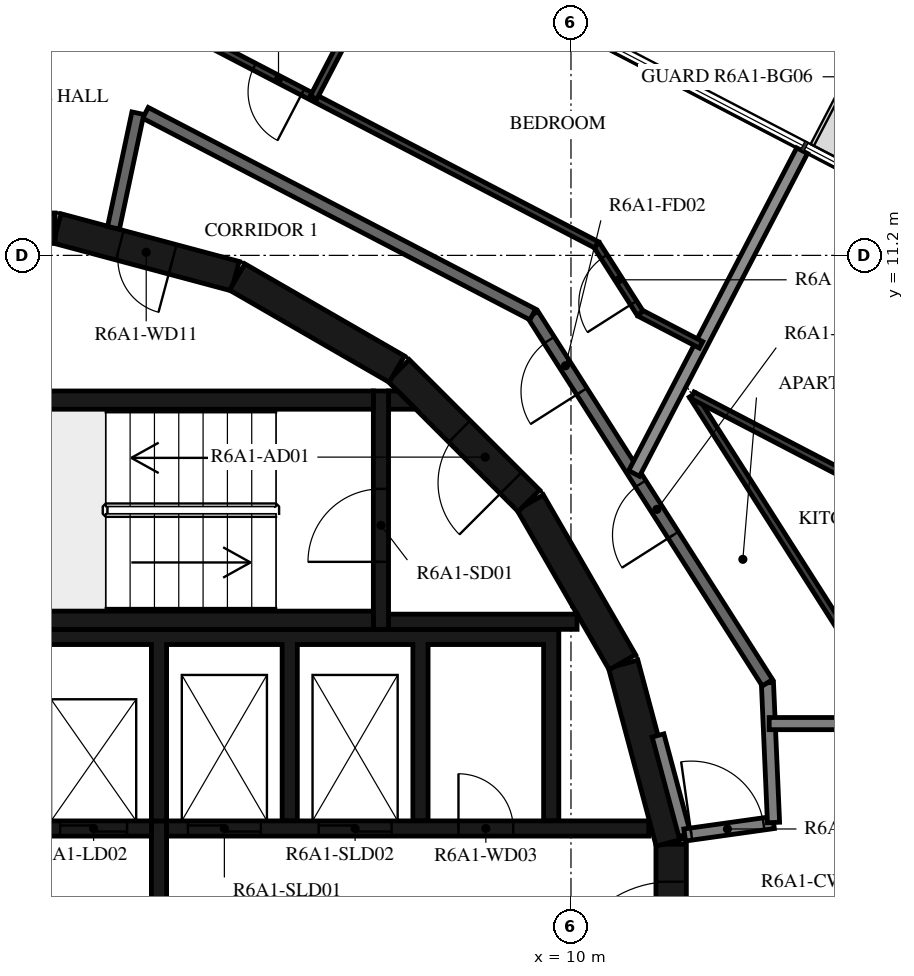
"""IFC4 building model, lengths in metres.
Left out: names, types, materials, properties, quantities, classifications, styles, units other than length and angle.
Written with IfcOpenShell. Run it as: python <this file> out.ifc"""

import sys

from ifc_helpers import new_model, si_unit, direction, frame, frame_2d, origin, place, context, subcontext, project, spatial, polyline, rectangle, outline, extrude, element, fill, save


model = new_model("IFC4")
c1 = context("Model", 3, precision=1e-05, world=origin(), true_north=direction((0.0, 1.0)))
c2 = subcontext(c1, "Body", "Model", "MODEL_VIEW")
j1 = project(units=[si_unit("LENGTHUNIT", "METRE"), si_unit("PLANEANGLEUNIT", "RADIAN")], contexts=[c1])
p1 = place(None, origin())
s1 = spatial("IfcSite", under=j1, at=p1, CompositionType="ELEMENT")
p2 = place(p1, origin())
s2 = spatial("IfcBuilding", under=s1, at=p2, CompositionType="ELEMENT")
p3 = place(p2, frame((0.0, 0.0, 230.2)))
s3 = spatial("IfcBuildingStorey", under=s2, at=p3, CompositionType="ELEMENT", Elevation=230.2)
p4 = place(p3, frame((11.647, -1.516, 0.0), z_axis=(0.0, 0.0, 1.0), x_axis=(0.0, 1.0, 0.0)))
e1 = element("IfcWall", 1, at=p4, inside=s3, PredefinedType="SHEAR", context=c2, shape_type="SweptSolid", body=[
    extrude(rectangle(XDim=3.033, YDim=0.5, at=frame_2d((1.516, 0.0))), origin(), (0.0, 0.0, 1.0), 3.12),
])
p5 = place(p4, frame((0.616, 0.0, 0.0)))
e2 = element("IfcOpeningElement", 2, at=p5, cuts=e1, PredefinedType="OPENING", context=c2, shape_type="SweptSolid", body=[
    extrude(rectangle(XDim=1.8, YDim=2.1, at=frame_2d((0.9, 1.05))), frame((0.0, 0.26, 0.0), z_axis=(0.0, -1.0, 0.0), x_axis=(1.0, 0.0, 0.0)), (0.0, 0.0, 1.0), 0.52),
])
for number, where, z_axis, x_axis in (
    (3, (11.643, 1.55, 0.0), (0.0, 0.0, 1.0), (-0.259, 0.966, 0.0)),
    (4, (10.845, 4.51, 0.0), (0.0, 0.0, 1.0), (-0.5, 0.866, 0.0)),
):
    element("IfcWall", number, at=place(p3, frame(where, z_axis=z_axis, x_axis=x_axis)), inside=s3, PredefinedType="SHEAR", context=c2, shape_type="SweptSolid", body=[
        extrude(rectangle(XDim=3.033, YDim=0.5, at=frame_2d((1.516, 0.0))), origin(), (0.0, 0.0, 1.0), 3.12),
    ])
p6 = place(p3, frame((9.308, 7.164, 0.0), z_axis=(0.0, 0.0, 1.0), x_axis=(-0.707106781187, 0.707106781187, 0.0)))
e5 = element("IfcWall", 5, at=p6, inside=s3, PredefinedType="SHEAR", context=c2, shape_type="SweptSolid", body=[
    extrude(rectangle(XDim=3.032, YDim=0.5, at=frame_2d((1.516, 0.0))), origin(), (0.0, 0.0, 1.0), 3.12),
])
p7 = place(p6, frame((0.416, 0.0, 0.0)))
e6 = element("IfcOpeningElement", 6, at=p7, cuts=e5, PredefinedType="OPENING", context=c2, shape_type="SweptSolid", body=[
    extrude(rectangle(XDim=1.2, YDim=2.1, at=frame_2d((0.6, 1.05))), frame((0.0, 0.26, 0.0), z_axis=(0.0, -1.0, 0.0), x_axis=(1.0, 0.0, 0.0)), (0.0, 0.0, 1.0), 0.52),
])
p8 = place(p3, frame((7.137, 9.329, 0.0), z_axis=(0.0, 0.0, 1.0), x_axis=(-0.865975092491, 0.500087131594, 0.0)))
e7 = element("IfcWall", 7, at=p8, inside=s3, PredefinedType="SHEAR", context=c2, shape_type="SweptSolid", body=[
    extrude(rectangle(XDim=3.033, YDim=0.5, at=frame_2d((1.516, 0.0))), origin(), (0.0, 0.0, 1.0), 3.12),
])
p9 = place(p3, frame((4.479, 10.858, 0.0), z_axis=(0.0, 0.0, 1.0), x_axis=(-0.965948410781, 0.258734743916, 0.0)))
e8 = element("IfcWall", 8, at=p9, inside=s3, PredefinedType="SHEAR", context=c2, shape_type="SweptSolid", body=[
    extrude(rectangle(XDim=3.033, YDim=0.5, at=frame_2d((1.516, 0.0))), origin(), (0.0, 0.0, 1.0), 3.12),
])
p10 = place(p9, frame((1.066, 0.0, 0.0)))
e9 = element("IfcOpeningElement", 9, at=p10, cuts=e8, PredefinedType="OPENING", context=c2, shape_type="SweptSolid", body=[
    extrude(rectangle(XDim=0.9, YDim=2.1, at=frame_2d((0.45, 1.05))), frame((0.0, 0.26, 0.0), z_axis=(0.0, -1.0, 0.0), x_axis=(1.0, 0.0, 0.0)), (0.0, 0.0, 1.0), 0.52),
])
p11 = place(p3, frame((1.516, 11.647, 0.0), z_axis=(0.0, 0.0, 1.0), x_axis=(-1.0, 0.0, 0.0)))
e10 = element("IfcWall", 10, at=p11, inside=s3, PredefinedType="SHEAR", context=c2, shape_type="SweptSolid", body=[
    extrude(rectangle(XDim=3.033, YDim=0.5, at=frame_2d((1.516, 0.0))), origin(), (0.0, 0.0, 1.0), 3.12),
])
for number, where, z_axis, x_axis in (
    (11, (0.0, 5.2, 0.0), (0.0, 0.0, 1.0), (1.0, 0.0, 0.0)),
    (12, (0.0, 8.82, 0.0), (0.0, 0.0, 1.0), (1.0, 0.0, 0.0)),
):
    element("IfcWall", number, at=place(p3, frame(where, z_axis=z_axis, x_axis=x_axis)), inside=s3, PredefinedType="SHEAR", context=c2, shape_type="SweptSolid", body=[
        extrude(rectangle(XDim=6.75, YDim=0.3, at=frame_2d((3.375, 0.0))), origin(), (0.0, 0.0, 1.0), 3.12),
    ])
p12 = place(p3, frame((6.875, 5.05, 0.0), z_axis=(0.0, 0.0, 1.0), x_axis=(0.0, 1.0, 0.0)))
e13 = element("IfcWall", 13, at=p12, inside=s3, PredefinedType="SHEAR", context=c2, shape_type="SweptSolid", body=[
    extrude(rectangle(XDim=3.92, YDim=0.25, at=frame_2d((1.96, 0.0))), origin(), (0.0, 0.0, 1.0), 3.12),
])
p13 = place(p12, frame((1.11, 0.0, 0.0)))
e14 = element("IfcOpeningElement", 14, at=p13, cuts=e13, PredefinedType="OPENING", context=c2, shape_type="SweptSolid", body=[
    extrude(rectangle(XDim=1.2, YDim=2.1, at=frame_2d((0.6, 1.05))), frame((0.0, 0.135, 0.0), z_axis=(0.0, -1.0, 0.0), x_axis=(1.0, 0.0, 0.0)), (0.0, 0.0, 1.0), 0.27),
])
p14 = place(p3, frame((7.0, 5.175, 0.0), z_axis=(0.0, 0.0, 1.0), x_axis=(1.0, 0.0, 0.0)))
e15 = element("IfcWall", 15, at=p14, inside=s3, PredefinedType="SHEAR", context=c2, shape_type="SweptSolid", body=[
    extrude(rectangle(XDim=3.1, YDim=0.25, at=frame_2d((1.55, 0.0))), origin(), (0.0, 0.0, 1.0), 3.12),
])
p15 = place(p3, origin())
e16 = element("IfcWall", 16, at=p15, inside=s3, PredefinedType="SHEAR", context=c2, shape_type="SweptSolid", body=[
    extrude(outline(polyline([(7.448, 8.67), (7.0, 8.67), (7.0, 8.97), (7.148, 8.97), (7.448, 8.67)])), origin(), (0.0, 0.0, 1.0), 3.12),
])
p16 = place(p3, origin())
e17 = element("IfcWall", 17, at=p16, inside=s3, PredefinedType="SHEAR", context=c2, shape_type="SweptSolid", body=[
    extrude(outline(polyline([(-9.55, 4.8), (-5.5, 4.8), (-5.5, 1.9), (-5.25, 1.9), (-5.25, 4.8), (-1.2, 4.8), (-1.2, 1.9), (-0.95, 1.9), (-0.95, 4.8), (0.95, 4.8), (0.95, 1.9), (1.2, 1.9), (1.2, 4.8), (3.1, 4.8), (3.1, 1.9), (3.35, 1.9), (3.35, 4.8), (5.25, 4.8), (5.25, 1.9), (5.5, 1.9), (5.5, 4.8), (7.4, 4.8), (7.4, 1.9), (7.65, 1.9), (7.65, 4.8), (9.55, 4.8), (9.55, 1.9), (9.8, 1.9), (9.8, 4.8), (9.8, 5.05), (-9.8, 5.05), (-9.8, 4.8), (-9.8, 1.9), (-9.55, 1.9), (-9.55, 4.8)])), origin(), (0.0, 0.0, 1.0), 3.12),
])
p17 = place(p3, frame((-11.28, 1.775, 0.0), z_axis=(0.0, 0.0, 1.0), x_axis=(1.0, 0.0, 0.0)))
e18 = element("IfcWall", 18, at=p17, inside=s3, PredefinedType="SHEAR", context=c2, shape_type="SweptSolid", body=[
    extrude(rectangle(XDim=14.38, YDim=0.25, at=frame_2d((7.19, 0.0))), origin(), (0.0, 0.0, 1.0), 3.12),
])
p18 = place(p17, frame((10.73, 0.0, 0.0)))
e19 = element("IfcOpeningElement", 19, at=p18, cuts=e18, PredefinedType="OPENING", context=c2, shape_type="SweptSolid", body=[
    extrude(rectangle(XDim=1.1, YDim=2.1, at=frame_2d((0.55, 1.05))), frame((0.0, 0.135, 0.0), z_axis=(0.0, -1.0, 0.0), x_axis=(1.0, 0.0, 0.0)), (0.0, 0.0, 1.0), 0.27),
])
p19 = place(p17, frame((12.88, 0.0, 0.0)))
e20 = element("IfcOpeningElement", 20, at=p19, cuts=e18, PredefinedType="OPENING", context=c2, shape_type="SweptSolid", body=[
    extrude(rectangle(XDim=1.1, YDim=2.1, at=frame_2d((0.55, 1.05))), frame((0.0, 0.135, 0.0), z_axis=(0.0, -1.0, 0.0), x_axis=(1.0, 0.0, 0.0)), (0.0, 0.0, 1.0), 0.27),
])
p20 = place(p17, frame((3.305, 0.0, 0.0)))
e21 = element("IfcOpeningElement", 21, at=p20, cuts=e18, PredefinedType="OPENING", context=c2, shape_type="SweptSolid", body=[
    extrude(rectangle(XDim=0.9, YDim=2.1, at=frame_2d((0.45, 1.05))), frame((0.0, 0.135, 0.0), z_axis=(0.0, -1.0, 0.0), x_axis=(1.0, 0.0, 0.0)), (0.0, 0.0, 1.0), 0.27),
])
p21 = place(p17, frame((7.605, 0.0, 0.0)))
e22 = element("IfcOpeningElement", 22, at=p21, cuts=e18, PredefinedType="OPENING", context=c2, shape_type="SweptSolid", body=[
    extrude(rectangle(XDim=0.9, YDim=2.1, at=frame_2d((0.45, 1.05))), frame((0.0, 0.135, 0.0), z_axis=(0.0, -1.0, 0.0), x_axis=(1.0, 0.0, 0.0)), (0.0, 0.0, 1.0), 0.27),
])
p22 = place(p3, frame((3.35, 1.775, 0.0), z_axis=(0.0, 0.0, 1.0), x_axis=(1.0, 0.0, 0.0)))
e23 = element("IfcWall", 23, at=p22, inside=s3, PredefinedType="SHEAR", context=c2, shape_type="SweptSolid", body=[
    extrude(rectangle(XDim=7.93, YDim=0.25, at=frame_2d((3.965, 0.0))), origin(), (0.0, 0.0, 1.0), 3.12),
])
p23 = place(p22, frame((0.35, 0.0, 0.0)))
e24 = element("IfcOpeningElement", 24, at=p23, cuts=e23, PredefinedType="OPENING", context=c2, shape_type="SweptSolid", body=[
    extrude(rectangle(XDim=1.2, YDim=2.4, at=frame_2d((0.6, 1.2))), frame((0.0, 0.135, 0.0), z_axis=(0.0, -1.0, 0.0), x_axis=(1.0, 0.0, 0.0)), (0.0, 0.0, 1.0), 0.27),
])
p24 = place(p22, frame((2.5, 0.0, 0.0)))
e25 = element("IfcOpeningElement", 25, at=p24, cuts=e23, PredefinedType="OPENING", context=c2, shape_type="SweptSolid", body=[
    extrude(rectangle(XDim=1.2, YDim=2.4, at=frame_2d((0.6, 1.2))), frame((0.0, 0.135, 0.0), z_axis=(0.0, -1.0, 0.0), x_axis=(1.0, 0.0, 0.0)), (0.0, 0.0, 1.0), 0.27),
])
p25 = place(p22, frame((4.8, 0.0, 0.0)))
e26 = element("IfcOpeningElement", 26, at=p25, cuts=e23, PredefinedType="OPENING", context=c2, shape_type="SweptSolid", body=[
    extrude(rectangle(XDim=0.9, YDim=2.1, at=frame_2d((0.45, 1.05))), frame((0.0, 0.135, 0.0), z_axis=(0.0, -1.0, 0.0), x_axis=(1.0, 0.0, 0.0)), (0.0, 0.0, 1.0), 0.27),
])
p26 = place(p3, frame((3.225, -1.9, 0.0), z_axis=(0.0, 0.0, 1.0), x_axis=(0.0, 1.0, 0.0)))
e27 = element("IfcWall", 27, at=p26, inside=s3, PredefinedType="SHEAR", context=c2, shape_type="SweptSolid", body=[
    extrude(rectangle(XDim=3.8, YDim=0.25, at=frame_2d((1.9, 0.0))), origin(), (0.0, 0.0, 1.0), 3.12),
])
p27 = place(p3, frame((11.87, 1.668, 0.0), z_axis=(0.0, 0.0, 1.0), x_axis=(-0.258836880648, 0.965921047093, 0.0)))
e28 = element("IfcWall", 28, at=p27, inside=s3, PredefinedType="STANDARD", context=c2, shape_type="SweptSolid", body=[
    extrude(rectangle(XDim=1.695, YDim=0.2, at=frame_2d((0.848, 0.0))), origin(), (0.0, 0.0, 1.0), 3.12),
])
p28 = place(p3, frame((11.87, 1.668, 0.0), z_axis=(0.0, 0.0, 1.0), x_axis=(0.990267985606, 0.139173692496, 0.0)))
e29 = element("IfcWall", 29, at=p28, inside=s3, PredefinedType="STANDARD", context=c2, shape_type="SweptSolid", body=[
    extrude(rectangle(XDim=1.475, YDim=0.2, at=frame_2d((0.738, 0.0))), origin(), (0.0, 0.0, 1.0), 3.12),
])
p29 = place(p28, frame((0.11, 0.0, 0.0)))
e30 = element("IfcOpeningElement", 30, at=p29, cuts=e29, PredefinedType="OPENING", context=c2, shape_type="SweptSolid", body=[
    extrude(rectangle(XDim=1.2, YDim=2.1, at=frame_2d((0.6, 1.05))), frame((0.0, 0.11, 0.0), z_axis=(0.0, -1.0, 0.0), x_axis=(1.0, 0.0, 0.0)), (0.0, 0.0, 1.0), 0.22),
])
p30 = place(p3, frame((13.331, 1.874, 0.0), z_axis=(0.0, 0.0, 1.0), x_axis=(-0.043621457762, 0.999048131184, 0.0)))
e31 = element("IfcWall", 31, at=p30, inside=s3, PredefinedType="STANDARD", context=c2, shape_type="SweptSolid", body=[
    extrude(rectangle(XDim=2.3, YDim=0.2, at=frame_2d((1.15, 0.0))), origin(), (0.0, 0.0, 1.0), 3.12),
])
p31 = place(p3, frame((13.231, 4.172, 0.0), z_axis=(0.0, 0.0, 1.0), x_axis=(-0.537304397561, 0.843388394728, 0.0)))
e32 = element("IfcWall", 32, at=p31, inside=s3, PredefinedType="STANDARD", context=c2, shape_type="SweptSolid", body=[
    extrude(rectangle(XDim=7.181, YDim=0.2, at=frame_2d((3.59, 0.0))), origin(), (0.0, 0.0, 1.0), 3.12),
])
p32 = place(p31, frame((2.881, 0.0, 0.0)))
e33 = element("IfcOpeningElement", 33, at=p32, cuts=e32, PredefinedType="OPENING", context=c2, shape_type="SweptSolid", body=[
    extrude(rectangle(XDim=1.0, YDim=2.1, at=frame_2d((0.5, 1.05))), frame((0.0, 0.11, 0.0), z_axis=(0.0, -1.0, 0.0), x_axis=(1.0, 0.0, 0.0)), (0.0, 0.0, 1.0), 0.22),
])
p33 = place(p31, frame((5.681, 0.0, 0.0)))
e34 = element("IfcOpeningElement", 34, at=p33, cuts=e32, PredefinedType="OPENING", context=c2, shape_type="SweptSolid", body=[
    extrude(rectangle(XDim=1.0, YDim=2.1, at=frame_2d((0.5, 1.05))), frame((0.0, 0.11, 0.0), z_axis=(0.0, -1.0, 0.0), x_axis=(1.0, 0.0, 0.0)), (0.0, 0.0, 1.0), 0.22),
])
p34 = place(p3, frame((9.372, 10.228, 0.0), z_axis=(0.0, 0.0, 1.0), x_axis=(-0.887005184532, 0.461759464021, 0.0)))
e35 = element("IfcWall", 35, at=p34, inside=s3, PredefinedType="STANDARD", context=c2, shape_type="SweptSolid", body=[
    extrude(rectangle(XDim=7.181, YDim=0.2, at=frame_2d((3.591, 0.0))), origin(), (0.0, 0.0, 1.0), 3.12),
])
p35 = place(p3, frame((2.878, 13.538, 0.0), z_axis=(0.0, 0.0, 1.0), x_axis=(-0.207893604596, -0.978151444904, 0.0)))
e36 = element("IfcWall", 36, at=p35, inside=s3, PredefinedType="STANDARD", context=c2, shape_type="SweptSolid", body=[
    extrude(rectangle(XDim=1.927, YDim=0.2, at=frame_2d((0.963, 0.0))), origin(), (0.0, 0.0, 1.0), 3.12),
])
p36 = place(p3, frame((17.9, 3.5, 0.0), z_axis=(0.0, 0.0, 1.0), x_axis=(-1.0, 0.0, 0.0)))
e37 = element("IfcWall", 37, at=p36, inside=s3, PredefinedType="STANDARD", context=c2, shape_type="SweptSolid", body=[
    extrude(rectangle(XDim=4.64, YDim=0.2, at=frame_2d((2.32, 0.0))), origin(), (0.0, 0.0, 1.0), 3.12),
])
p37 = place(p3, frame((13.801, 12.922, 0.0), z_axis=(0.0, 0.0, 1.0), x_axis=(-0.461726485624, -0.887022351733, 0.0)))
e38 = element("IfcWall", 38, at=p37, inside=s3, PredefinedType="STANDARD", context=c2, shape_type="SweptSolid", body=[
    extrude(rectangle(XDim=5.984, YDim=0.2, at=frame_2d((2.992, 0.0))), origin(), (0.0, 0.0, 1.0), 2.73),
])
p38 = place(p3, frame((14.615, 4.79, 0.0), z_axis=(0.0, 0.0, 1.0), x_axis=(-0.537312928062, 0.843382960071, 0.0)))
e39 = element("IfcWall", 39, at=p38, inside=s3, PredefinedType="PARTITIONING", context=c2, shape_type="SweptSolid", body=[
    extrude(rectangle(XDim=4.875, YDim=0.12, at=frame_2d((2.437, 0.0))), origin(), (0.0, 0.0, 1.0), 3.12),
])
p39 = place(p3, frame((21.085, 4.169, 0.0), z_axis=(0.0, 0.0, 1.0), x_axis=(-0.887017373034, 0.461736050071, 0.0)))
e40 = element("IfcWall", 40, at=p39, inside=s3, PredefinedType="PARTITIONING", context=c2, shape_type="SweptSolid", body=[
    extrude(rectangle(XDim=10.247, YDim=0.12, at=frame_2d((5.123, 0.0))), origin(), (0.0, 0.0, 1.0), 3.12),
])
p40 = place(p39, frame((3.425, 0.0, 0.0)))
e41 = element("IfcOpeningElement", 41, at=p40, cuts=e40, PredefinedType="OPENING", context=c2, shape_type="SweptSolid", body=[
    extrude(rectangle(XDim=0.9, YDim=2.1, at=frame_2d((0.45, 1.05))), frame((0.0, 0.07, 0.0), z_axis=(0.0, -1.0, 0.0), x_axis=(1.0, 0.0, 0.0)), (0.0, 0.0, 1.0), 0.14),
])
p41 = place(p3, frame((12.139, 9.729, 0.0), z_axis=(0.0, 0.0, 1.0), x_axis=(-0.887046876331, 0.461679368383, 0.0)))
e42 = element("IfcWall", 42, at=p41, inside=s3, PredefinedType="PARTITIONING", context=c2, shape_type="SweptSolid", body=[
    extrude(rectangle(XDim=1.13, YDim=0.12, at=frame_2d((0.565, 0.0))), origin(), (0.0, 0.0, 1.0), 3.12),
])
p42 = place(p3, frame((11.137, 10.25, 0.0), z_axis=(0.0, 0.0, 1.0), x_axis=(-0.537231369635, 0.843434914786, 0.0)))
e43 = element("IfcWall", 43, at=p42, inside=s3, PredefinedType="PARTITIONING", context=c2, shape_type="SweptSolid", body=[
    extrude(rectangle(XDim=1.332, YDim=0.12, at=frame_2d((0.666, 0.0))), origin(), (0.0, 0.0, 1.0), 3.12),
])
p43 = place(p42, frame((0.2, 0.0, 0.0)))
e44 = element("IfcOpeningElement", 44, at=p43, cuts=e43, PredefinedType="OPENING", context=c2, shape_type="SweptSolid", body=[
    extrude(rectangle(XDim=0.9, YDim=2.1, at=frame_2d((0.45, 1.05))), frame((0.0, 0.07, 0.0), z_axis=(0.0, -1.0, 0.0), x_axis=(1.0, 0.0, 0.0)), (0.0, 0.0, 1.0), 0.14),
])
p44 = place(p3, frame((10.421, 11.373, 0.0), z_axis=(0.0, 0.0, 1.0), x_axis=(-0.887012970857, 0.461744506769, 0.0)))
e45 = element("IfcWall", 45, at=p44, inside=s3, PredefinedType="PARTITIONING", context=c2, shape_type="SweptSolid", body=[
    extrude(rectangle(XDim=7.985, YDim=0.12, at=frame_2d((3.992, 0.0))), origin(), (0.0, 0.0, 1.0), 3.12),
])
p45 = place(p44, frame((5.448, 0.0, 0.0)))
e46 = element("IfcOpeningElement", 46, at=p45, cuts=e45, PredefinedType="OPENING", context=c2, shape_type="SweptSolid", body=[
    extrude(rectangle(XDim=0.9, YDim=2.1, at=frame_2d((0.45, 1.05))), frame((0.0, 0.07, 0.0), z_axis=(0.0, -1.0, 0.0), x_axis=(1.0, 0.0, 0.0)), (0.0, 0.0, 1.0), 0.14),
])
p46 = place(p3, frame((7.122, 16.399, 0.0), z_axis=(0.0, 0.0, 1.0), x_axis=(-0.461763975246, -0.887002836053, 0.0)))
e47 = element("IfcWall", 47, at=p46, inside=s3, PredefinedType="PARTITIONING", context=c2, shape_type="SweptSolid", body=[
    extrude(rectangle(XDim=2.934, YDim=0.12, at=frame_2d((1.467, 0.0))), origin(), (0.0, 0.0, 1.0), 2.73),
])
p47 = place(p13, origin())
e48 = element("IfcDoor", 48, at=p47, inside=s3, OperationType="SINGLE_SWING_LEFT", PredefinedType="DOOR", context=c2, shape_type="SweptSolid", body=[
    extrude(rectangle(XDim=1.2, YDim=2.1, at=frame_2d((0.6, 1.05))), frame((0.0, 0.025, 0.0), z_axis=(0.0, -1.0, 0.0), x_axis=(1.0, 0.0, 0.0)), (0.0, 0.0, 1.0), 0.05),
])
fill(e14, e48)
p48 = place(p7, origin())
e49 = element("IfcDoor", 49, at=p48, inside=s3, OperationType="SINGLE_SWING_RIGHT", PredefinedType="DOOR", context=c2, shape_type="SweptSolid", body=[
    extrude(rectangle(XDim=1.2, YDim=2.1, at=frame_2d((0.6, 1.05))), frame((0.0, 0.025, 0.0), z_axis=(0.0, -1.0, 0.0), x_axis=(1.0, 0.0, 0.0)), (0.0, 0.0, 1.0), 0.05),
])
fill(e6, e49)
p49 = place(p5, origin())
e50 = element("IfcDoor", 50, at=p49, inside=s3, OperationType="DOUBLE_DOOR_SINGLE_SWING", PredefinedType="DOOR", context=c2, shape_type="SweptSolid", body=[
    extrude(rectangle(XDim=1.8, YDim=2.1, at=frame_2d((0.9, 1.05))), frame((0.0, 0.025, 0.0), z_axis=(0.0, -1.0, 0.0), x_axis=(1.0, 0.0, 0.0)), (0.0, 0.0, 1.0), 0.05),
])
fill(e2, e50)
p50 = place(p19, origin())
e51 = element("IfcDoor", 51, at=p50, inside=s3, OperationType="DOUBLE_DOOR_SLIDING", PredefinedType="DOOR", context=c2, shape_type="SweptSolid", body=[
    extrude(rectangle(XDim=1.1, YDim=2.1, at=frame_2d((0.55, 1.05))), frame((0.0, 0.025, 0.0), z_axis=(0.0, -1.0, 0.0), x_axis=(1.0, 0.0, 0.0)), (0.0, 0.0, 1.0), 0.05),
])
fill(e20, e51)
p51 = place(p23, origin())
e52 = element("IfcDoor", 52, at=p51, inside=s3, OperationType="DOUBLE_DOOR_SLIDING", PredefinedType="DOOR", context=c2, shape_type="SweptSolid", body=[
    extrude(rectangle(XDim=1.2, YDim=2.4, at=frame_2d((0.6, 1.2))), frame((0.0, 0.025, 0.0), z_axis=(0.0, -1.0, 0.0), x_axis=(1.0, 0.0, 0.0)), (0.0, 0.0, 1.0), 0.05),
])
fill(e24, e52)
p52 = place(p24, origin())
e53 = element("IfcDoor", 53, at=p52, inside=s3, OperationType="DOUBLE_DOOR_SLIDING", PredefinedType="DOOR", context=c2, shape_type="SweptSolid", body=[
    extrude(rectangle(XDim=1.2, YDim=2.4, at=frame_2d((0.6, 1.2))), frame((0.0, 0.025, 0.0), z_axis=(0.0, -1.0, 0.0), x_axis=(1.0, 0.0, 0.0)), (0.0, 0.0, 1.0), 0.05),
])
fill(e25, e53)
p53 = place(p25, origin())
e54 = element("IfcDoor", 54, at=p53, inside=s3, OperationType="SINGLE_SWING_LEFT", PredefinedType="DOOR", context=c2, shape_type="SweptSolid", body=[
    extrude(rectangle(XDim=0.9, YDim=2.1, at=frame_2d((0.45, 1.05))), frame((0.0, 0.025, 0.0), z_axis=(0.0, -1.0, 0.0), x_axis=(1.0, 0.0, 0.0)), (0.0, 0.0, 1.0), 0.05),
])
fill(e26, e54)
p54 = place(p10, origin())
e55 = element("IfcDoor", 55, at=p54, inside=s3, OperationType="SINGLE_SWING_LEFT", PredefinedType="DOOR", context=c2, shape_type="SweptSolid", body=[
    extrude(rectangle(XDim=0.9, YDim=2.1, at=frame_2d((0.45, 1.05))), frame((0.0, 0.025, 0.0), z_axis=(0.0, -1.0, 0.0), x_axis=(1.0, 0.0, 0.0)), (0.0, 0.0, 1.0), 0.05),
])
fill(e9, e55)
p55 = place(p32, origin())
e56 = element("IfcDoor", 56, at=p55, inside=s3, OperationType="SINGLE_SWING_LEFT", PredefinedType="DOOR", context=c2, shape_type="SweptSolid", body=[
    extrude(rectangle(XDim=1.0, YDim=2.1, at=frame_2d((0.5, 1.05))), frame((0.0, 0.025, 0.0), z_axis=(0.0, -1.0, 0.0), x_axis=(1.0, 0.0, 0.0)), (0.0, 0.0, 1.0), 0.05),
])
fill(e33, e56)
p56 = place(p33, origin())
e57 = element("IfcDoor", 57, at=p56, inside=s3, OperationType="SINGLE_SWING_LEFT", PredefinedType="DOOR", context=c2, shape_type="SweptSolid", body=[
    extrude(rectangle(XDim=1.0, YDim=2.1, at=frame_2d((0.5, 1.05))), frame((0.0, 0.025, 0.0), z_axis=(0.0, -1.0, 0.0), x_axis=(1.0, 0.0, 0.0)), (0.0, 0.0, 1.0), 0.05),
])
fill(e34, e57)
p57 = place(p43, origin())
e58 = element("IfcDoor", 58, at=p57, inside=s3, OperationType="SINGLE_SWING_LEFT", PredefinedType="DOOR", context=c2, shape_type="SweptSolid", body=[
    extrude(rectangle(XDim=0.9, YDim=2.1, at=frame_2d((0.45, 1.05))), frame((0.0, 0.025, 0.0), z_axis=(0.0, -1.0, 0.0), x_axis=(1.0, 0.0, 0.0)), (0.0, 0.0, 1.0), 0.05),
])
fill(e44, e58)
p58 = place(p45, origin())
e59 = element("IfcDoor", 59, at=p58, inside=s3, OperationType="SINGLE_SWING_RIGHT", PredefinedType="DOOR", context=c2, shape_type="SweptSolid", body=[
    extrude(rectangle(XDim=0.9, YDim=2.1, at=frame_2d((0.45, 1.05))), frame((0.0, 0.025, 0.0), z_axis=(0.0, -1.0, 0.0), x_axis=(1.0, 0.0, 0.0)), (0.0, 0.0, 1.0), 0.05),
])
fill(e46, e59)
p59 = place(p29, origin())
e60 = element("IfcDoor", 60, at=p59, inside=s3, OperationType="DOUBLE_DOOR_SINGLE_SWING", PredefinedType="DOOR", context=c2, shape_type="SweptSolid", body=[
    extrude(rectangle(XDim=1.2, YDim=2.1, at=frame_2d((0.6, 1.05))), frame((0.0, 0.025, 0.0), z_axis=(0.0, -1.0, 0.0), x_axis=(1.0, 0.0, 0.0)), (0.0, 0.0, 1.0), 0.05),
])
fill(e30, e60)
save(model, sys.argv[1])
